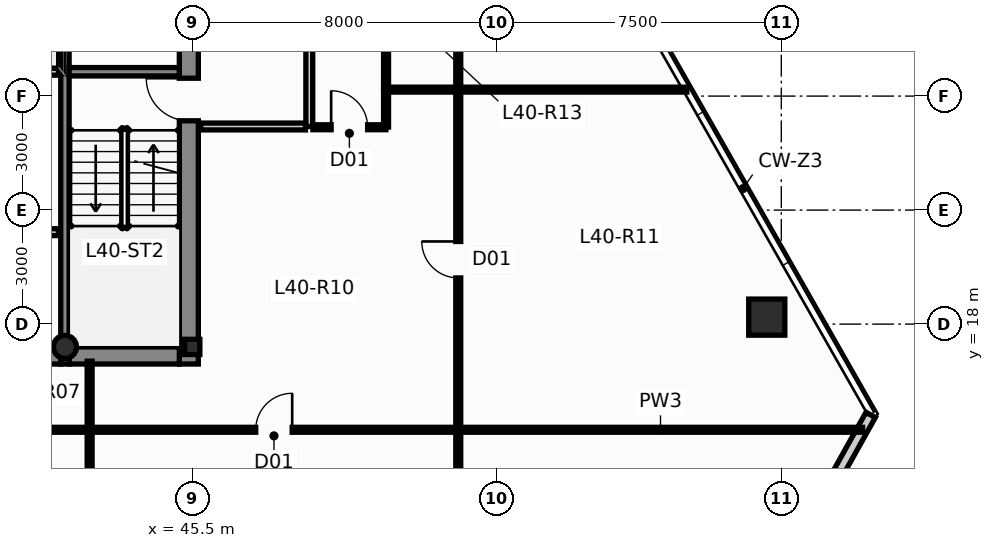
"""IFC4 building model, lengths in metres.
Left out: names, types, materials, properties, quantities, classifications, styles, units other than length and angle.
Written with IfcOpenShell. Run it as: python <this file> out.ifc"""

import sys

from ifc_helpers import new_model, si_unit, direction, frame, frame_2d, origin, origin_2d, place, context, subcontext, project, spatial, rectangle, hollow_rectangle, hollow_circle, i_section, extrude, source, transform, mapped, element, fill, save


model = new_model("IFC4")
c1 = context("Model", 3, precision=1e-05, world=origin(), true_north=direction((0.0, 1.0)))
c2 = subcontext(c1, "Body", "Model", "MODEL_VIEW")
j1 = project(units=[si_unit("LENGTHUNIT", "METRE"), si_unit("PLANEANGLEUNIT", "RADIAN")], contexts=[c1])
p1 = place(None, origin())
s1 = spatial("IfcSite", under=j1, at=p1, CompositionType="ELEMENT")
p2 = place(p1, origin())
s2 = spatial("IfcBuilding", under=s1, at=p2, CompositionType="ELEMENT")
p3 = place(p2, frame((0.0, 0.0, 154.85)))
s3 = spatial("IfcBuildingStorey", under=s2, at=p3, CompositionType="ELEMENT", Elevation=154.85)
m1 = source(origin(), c2, "Body", "SweptSolid", [
    extrude(i_section(OverallWidth=0.4, OverallDepth=0.4, WebThickness=0.02, FlangeThickness=0.032, at=origin_2d()), origin(), (0.0, 0.0, 1.0), 3.65),
])
p4 = place(p3, frame((45.5, 17.4, 0.0), z_axis=(0.0, 0.0, 1.0), x_axis=(1.0, 0.0, 0.0)))
e1 = element("IfcColumn", 1, at=p4, inside=s3, PredefinedType="COLUMN", context=c2, shape_type="MappedRepresentation", body=[
    mapped(m1, transform((0.0, 0.0, 0.0), scale=1.0)),
])
m2 = source(origin(), c2, "Body", "SweptSolid", [
    extrude(hollow_circle(Radius=0.305, WallThickness=0.025, at=origin_2d()), origin(), (0.0, 0.0, 1.0), 3.65),
])
p5 = place(p3, frame((42.15, 17.4, 0.0), z_axis=(0.0, 0.0, 1.0), x_axis=(1.0, 0.0, 0.0)))
e2 = element("IfcColumn", 2, at=p5, inside=s3, PredefinedType="COLUMN", context=c2, shape_type="MappedRepresentation", body=[
    mapped(m2, transform((0.0, 0.0, 0.0), scale=1.0)),
])
p6 = place(p3, frame((45.41, 16.95, 0.0), z_axis=(0.0, 0.0, 1.0), x_axis=(0.0, 1.0, 0.0)))
e3 = element("IfcWall", 3, at=p6, inside=s3, PredefinedType="SHEAR", context=c2, shape_type="SweptSolid", body=[
    extrude(rectangle(XDim=13.275, YDim=0.5, at=frame_2d((6.638, 0.0))), origin(), (0.0, 0.0, 1.0), 3.65),
])
p7 = place(p6, frame((6.4, 0.0, 0.0)))
e4 = element("IfcOpeningElement", 4, at=p7, cuts=e3, PredefinedType="OPENING", context=c2, shape_type="SweptSolid", body=[
    extrude(rectangle(XDim=1.12, YDim=2.15, at=frame_2d((0.56, 1.075))), frame((0.0, 0.262, 0.0), z_axis=(0.0, -1.0, 0.0), x_axis=(1.0, 0.0, 0.0)), (0.0, 0.0, 1.0), 0.524),
])
p8 = place(p6, frame((10.85, 0.0, 0.0)))
e5 = element("IfcOpeningElement", 5, at=p8, cuts=e3, PredefinedType="OPENING", context=c2, shape_type="SweptSolid", body=[
    extrude(rectangle(XDim=1.2, YDim=2.2, at=frame_2d((0.6, 1.1))), frame((0.0, 0.262, 0.0), z_axis=(0.0, -1.0, 0.0), x_axis=(1.0, 0.0, 0.0)), (0.0, 0.0, 1.0), 0.524),
])
p9 = place(p3, frame((33.96, 17.175, 0.0), z_axis=(0.0, 0.0, 1.0), x_axis=(1.0, 0.0, 0.0)))
e6 = element("IfcWall", 6, at=p9, inside=s3, PredefinedType="SHEAR", context=c2, shape_type="SweptSolid", body=[
    extrude(rectangle(XDim=8.08, YDim=0.45, at=frame_2d((4.04, 0.0))), origin(), (0.0, 0.0, 1.0), 3.65),
])
p10 = place(p3, frame((42.26, 17.175, 0.0), z_axis=(0.0, 0.0, 1.0), x_axis=(1.0, 0.0, 0.0)))
e7 = element("IfcWall", 7, at=p10, inside=s3, PredefinedType="SHEAR", context=c2, shape_type="SweptSolid", body=[
    extrude(rectangle(XDim=2.9, YDim=0.45, at=frame_2d((1.45, 0.0))), origin(), (0.0, 0.0, 1.0), 3.65),
])
p11 = place(p3, frame((42.15, 16.95, 0.0), z_axis=(0.0, 0.0, 1.0), x_axis=(0.0, 1.0, 0.0)))
e8 = element("IfcWall", 8, at=p11, inside=s3, PredefinedType="SHEAR", context=c2, shape_type="SweptSolid", body=[
    extrude(rectangle(XDim=13.275, YDim=0.22, at=frame_2d((6.638, 0.0))), origin(), (0.0, 0.0, 1.0), 3.65),
])
p12 = place(p3, frame((42.26, 24.64, 0.0), z_axis=(0.0, 0.0, 1.0), x_axis=(1.0, 0.0, 0.0)))
e9 = element("IfcWall", 9, at=p12, inside=s3, PredefinedType="SHEAR", context=c2, shape_type="SweptSolid", body=[
    extrude(rectangle(XDim=2.9, YDim=0.22, at=frame_2d((1.45, 0.0))), origin(), (0.0, 0.0, 1.0), 3.65),
])
m3 = source(origin(), c2, "Body", "SweptSolid", [
    extrude(hollow_rectangle(XDim=0.95, YDim=0.95, WallThickness=0.05, at=origin_2d()), origin(), (0.0, 0.0, 1.0), 3.651),
])
p13 = place(p3, frame((60.618, 18.184, 0.0), z_axis=(-0.010431780378, -0.021599135014, 0.999712286273), x_axis=(0.900476348161, -0.434904985489, 0.0)))
e10 = element("IfcColumn", 10, at=p13, inside=s3, PredefinedType="COLUMN", context=c2, shape_type="MappedRepresentation", body=[
    mapped(m3, transform((0.0, 0.0, 0.0), scale=1.0)),
])
p14 = place(p3, frame((63.352, 15.613, 0.0), z_axis=(0.0, 0.0, 1.0), x_axis=(-0.487718245704, -0.873001095536, 0.0)))
e11 = element("IfcWall", 11, at=p14, inside=s3, PredefinedType="STANDARD", context=c2, shape_type="SweptSolid", body=[
    extrude(rectangle(XDim=10.561, YDim=0.28, at=frame_2d((5.28, 0.0))), origin(), (0.0, 0.0, 1.0), 3.4),
])
p15 = place(p14, frame((4.53, 0.0, 0.9)))
e12 = element("IfcOpeningElement", 12, at=p15, cuts=e11, PredefinedType="OPENING", context=c2, shape_type="SweptSolid", body=[
    extrude(rectangle(XDim=1.5, YDim=1.8, at=frame_2d((0.75, 0.9))), frame((0.0, 0.152, 0.0), z_axis=(0.0, -1.0, 0.0), x_axis=(1.0, 0.0, 0.0)), (0.0, 0.0, 1.0), 0.304),
])
p16 = place(p3, frame((40.2, 24.64, 0.0), z_axis=(0.0, 0.0, 1.0), x_axis=(1.0, 0.0, 0.0)))
e13 = element("IfcWall", 13, at=p16, inside=s3, PredefinedType="PARTITIONING", context=c2, shape_type="SweptSolid", body=[
    extrude(rectangle(XDim=1.78, YDim=0.18, at=frame_2d((0.89, 0.0))), origin(), (0.0, 0.0, 1.0), 3.4),
])
p17 = place(p3, frame((48.58, 23.2, 0.0), z_axis=(0.0, 0.0, 1.0), x_axis=(0.0, 1.0, 0.0)))
e14 = element("IfcWall", 14, at=p17, inside=s3, PredefinedType="PARTITIONING", context=c2, shape_type="SweptSolid", body=[
    extrude(rectangle(XDim=6.4, YDim=0.18, at=frame_2d((3.2, 0.0))), origin(), (0.0, 0.0, 1.0), 3.078),
])
p18 = place(p17, frame((2.65, 0.0, 0.0)))
e15 = element("IfcOpeningElement", 15, at=p18, cuts=e14, PredefinedType="OPENING", context=c2, shape_type="SweptSolid", body=[
    extrude(rectangle(XDim=1.05, YDim=2.15, at=frame_2d((0.525, 1.075))), frame((0.0, 0.102, 0.0), z_axis=(0.0, -1.0, 0.0), x_axis=(1.0, 0.0, 0.0)), (0.0, 0.0, 1.0), 0.204),
])
p19 = place(p3, frame((45.72, 23.2, 0.0), z_axis=(0.0, 0.0, 1.0), x_axis=(1.0, 0.0, 0.0)))
e16 = element("IfcWall", 16, at=p19, inside=s3, PredefinedType="PARTITIONING", context=c2, shape_type="SweptSolid", body=[
    extrude(rectangle(XDim=2.76, YDim=0.18, at=frame_2d((1.38, 0.0))), origin(), (0.0, 0.0, 1.0), 3.4),
])
p20 = place(p3, frame((40.22, 20.42, 0.0), z_axis=(0.0, 0.0, 1.0), x_axis=(1.0, 0.0, 0.0)))
e17 = element("IfcWall", 17, at=p20, inside=s3, PredefinedType="PARTITIONING", context=c2, shape_type="SweptSolid", body=[
    extrude(rectangle(XDim=1.76, YDim=0.18, at=frame_2d((0.88, 0.0))), origin(), (0.0, 0.0, 1.0), 3.4),
])
p21 = place(p3, frame((52.505, 15.22, 0.0), z_axis=(0.0, 0.0, 1.0), x_axis=(1.0, 0.0, 0.0)))
e18 = element("IfcWall", 18, at=p21, inside=s3, PredefinedType="PARTITIONING", context=c2, shape_type="SweptSolid", body=[
    extrude(rectangle(XDim=10.633, YDim=0.13, at=frame_2d((5.317, 0.0))), origin(), (0.0, 0.0, 1.0), 3.4),
])
p22 = place(p3, frame((42.805, 15.22, 0.0), z_axis=(0.0, 0.0, 1.0), x_axis=(1.0, 0.0, 0.0)))
e19 = element("IfcWall", 19, at=p22, inside=s3, PredefinedType="PARTITIONING", context=c2, shape_type="SweptSolid", body=[
    extrude(rectangle(XDim=9.69, YDim=0.13, at=frame_2d((4.845, 0.0))), origin(), (0.0, 0.0, 1.0), 3.078),
])
p23 = place(p22, frame((4.365, 0.0, 0.0)))
e20 = element("IfcOpeningElement", 20, at=p23, cuts=e19, PredefinedType="OPENING", context=c2, shape_type="SweptSolid", body=[
    extrude(rectangle(XDim=0.96, YDim=2.15, at=frame_2d((0.48, 1.075))), frame((0.0, 0.077, 0.0), z_axis=(0.0, -1.0, 0.0), x_axis=(1.0, 0.0, 0.0)), (0.0, 0.0, 1.0), 0.154),
])
p24 = place(p3, frame((33.205, 15.22, 0.0), z_axis=(0.0, 0.0, 1.0), x_axis=(1.0, 0.0, 0.0)))
e21 = element("IfcWall", 21, at=p24, inside=s3, PredefinedType="PARTITIONING", context=c2, shape_type="SweptSolid", body=[
    extrude(rectangle(XDim=9.59, YDim=0.13, at=frame_2d((4.795, 0.0))), origin(), (0.0, 0.0, 1.0), 3.078),
])
p25 = place(p24, frame((4.315, 0.0, 0.0)))
e22 = element("IfcOpeningElement", 22, at=p25, cuts=e21, PredefinedType="OPENING", context=c2, shape_type="SweptSolid", body=[
    extrude(rectangle(XDim=0.96, YDim=2.15, at=frame_2d((0.48, 1.075))), frame((0.0, 0.077, 0.0), z_axis=(0.0, -1.0, 0.0), x_axis=(1.0, 0.0, 0.0)), (0.0, 0.0, 1.0), 0.154),
])
p26 = place(p3, frame((52.5, 15.225, 0.0), z_axis=(0.0, 0.0, 1.0), x_axis=(0.0, 1.0, 0.0)))
e23 = element("IfcWall", 23, at=p26, inside=s3, PredefinedType="PARTITIONING", context=c2, shape_type="SweptSolid", body=[
    extrude(rectangle(XDim=8.94, YDim=0.13, at=frame_2d((4.47, 0.0))), origin(), (0.0, 0.0, 1.0), 3.078),
])
p27 = place(p26, frame((3.99, 0.0, 0.0)))
e24 = element("IfcOpeningElement", 24, at=p27, cuts=e23, PredefinedType="OPENING", context=c2, shape_type="SweptSolid", body=[
    extrude(rectangle(XDim=0.96, YDim=2.15, at=frame_2d((0.48, 1.075))), frame((0.0, 0.077, 0.0), z_axis=(0.0, -1.0, 0.0), x_axis=(1.0, 0.0, 0.0)), (0.0, 0.0, 1.0), 0.154),
])
p28 = place(p3, frame((52.5, 6.409, 0.0), z_axis=(0.0, 0.0, 1.0), x_axis=(0.0, 1.0, 0.0)))
e25 = element("IfcWall", 25, at=p28, inside=s3, PredefinedType="PARTITIONING", context=c2, shape_type="SweptSolid", body=[
    extrude(rectangle(XDim=8.806, YDim=0.13, at=frame_2d((4.403, 0.0))), origin(), (0.0, 0.0, 1.0), 3.4),
])
p29 = place(p28, frame((3.973, 0.0, 0.0)))
e26 = element("IfcOpeningElement", 26, at=p29, cuts=e25, PredefinedType="OPENING", context=c2, shape_type="SweptSolid", body=[
    extrude(rectangle(XDim=0.96, YDim=2.15, at=frame_2d((0.48, 1.075))), frame((0.0, 0.077, 0.0), z_axis=(0.0, -1.0, 0.0), x_axis=(1.0, 0.0, 0.0)), (0.0, 0.0, 1.0), 0.154),
])
p30 = place(p3, frame((42.8, 6.489, 0.0), z_axis=(0.0, 0.0, 1.0), x_axis=(0.0, 1.0, 0.0)))
e27 = element("IfcWall", 27, at=p30, inside=s3, PredefinedType="PARTITIONING", context=c2, shape_type="SweptSolid", body=[
    extrude(rectangle(XDim=8.726, YDim=0.13, at=frame_2d((4.363, 0.0))), origin(), (0.0, 0.0, 1.0), 3.4),
])
p31 = place(p3, frame((52.505, 24.17, 0.0), z_axis=(0.0, 0.0, 1.0), x_axis=(1.0, 0.0, 0.0)))
e28 = element("IfcWall", 28, at=p31, inside=s3, PredefinedType="PARTITIONING", context=c2, shape_type="SweptSolid", body=[
    extrude(rectangle(XDim=6.01, YDim=0.13, at=frame_2d((3.005, 0.0))), origin(), (0.0, 0.0, 1.0), 3.4),
])
p32 = place(p3, frame((50.6, 24.175, 0.0), z_axis=(0.0, 0.0, 1.0), x_axis=(0.0, 1.0, 0.0)))
e29 = element("IfcWall", 29, at=p32, inside=s3, PredefinedType="PARTITIONING", context=c2, shape_type="SweptSolid", body=[
    extrude(rectangle(XDim=5.92, YDim=0.13, at=frame_2d((2.96, 0.0))), origin(), (0.0, 0.0, 1.0), 3.078),
])
p33 = place(p32, frame((2.48, 0.0, 0.0)))
e30 = element("IfcOpeningElement", 30, at=p33, cuts=e29, PredefinedType="OPENING", context=c2, shape_type="SweptSolid", body=[
    extrude(rectangle(XDim=0.96, YDim=2.15, at=frame_2d((0.48, 1.075))), frame((0.0, 0.077, 0.0), z_axis=(0.0, -1.0, 0.0), x_axis=(1.0, 0.0, 0.0)), (0.0, 0.0, 1.0), 0.154),
])
p34 = place(p3, frame((52.5, 24.175, 0.0), z_axis=(0.0, 0.0, 1.0), x_axis=(0.0, 1.0, 0.0)))
e31 = element("IfcWall", 31, at=p34, inside=s3, PredefinedType="PARTITIONING", context=c2, shape_type="SweptSolid", body=[
    extrude(rectangle(XDim=5.92, YDim=0.13, at=frame_2d((2.96, 0.0))), origin(), (0.0, 0.0, 1.0), 3.078),
])
p35 = place(p34, frame((2.48, 0.0, 0.0)))
e32 = element("IfcOpeningElement", 32, at=p35, cuts=e31, PredefinedType="OPENING", context=c2, shape_type="SweptSolid", body=[
    extrude(rectangle(XDim=0.96, YDim=2.15, at=frame_2d((0.48, 1.075))), frame((0.0, 0.077, 0.0), z_axis=(0.0, -1.0, 0.0), x_axis=(1.0, 0.0, 0.0)), (0.0, 0.0, 1.0), 0.154),
])
p36 = place(p3, frame((48.675, 23.18, 0.0), z_axis=(0.0, 0.0, 1.0), x_axis=(1.0, 0.0, 0.0)))
e33 = element("IfcWall", 33, at=p36, inside=s3, PredefinedType="PARTITIONING", context=c2, shape_type="SweptSolid", body=[
    extrude(rectangle(XDim=1.92, YDim=0.13, at=frame_2d((0.96, 0.0))), origin(), (0.0, 0.0, 1.0), 3.4),
])
p37 = place(p36, frame((0.48, 0.0, 0.0)))
e34 = element("IfcOpeningElement", 34, at=p37, cuts=e33, PredefinedType="OPENING", context=c2, shape_type="SweptSolid", body=[
    extrude(rectangle(XDim=0.96, YDim=2.15, at=frame_2d((0.48, 1.075))), frame((0.0, 0.077, 0.0), z_axis=(0.0, -1.0, 0.0), x_axis=(1.0, 0.0, 0.0)), (0.0, 0.0, 1.0), 0.154),
])
p38 = place(p3, frame((50.605, 24.17, 0.0), z_axis=(0.0, 0.0, 1.0), x_axis=(1.0, 0.0, 0.0)))
e35 = element("IfcWall", 35, at=p38, inside=s3, PredefinedType="PARTITIONING", context=c2, shape_type="SweptSolid", body=[
    extrude(rectangle(XDim=1.89, YDim=0.13, at=frame_2d((0.945, 0.0))), origin(), (0.0, 0.0, 1.0), 3.4),
])
p39 = place(p3, frame((42.8, 15.225, 0.0), z_axis=(0.0, 0.0, 1.0), x_axis=(0.0, 1.0, 0.0)))
e36 = element("IfcWall", 36, at=p39, inside=s3, PredefinedType="PARTITIONING", context=c2, shape_type="SweptSolid", body=[
    extrude(rectangle(XDim=1.8, YDim=0.13, at=frame_2d((0.9, 0.0))), origin(), (0.0, 0.0, 1.0), 3.4),
])
p40 = place(p3, frame((50.6, 23.185, 0.0), z_axis=(0.0, 0.0, 1.0), x_axis=(0.0, 1.0, 0.0)))
e37 = element("IfcWall", 37, at=p40, inside=s3, PredefinedType="PARTITIONING", context=c2, shape_type="SweptSolid", body=[
    extrude(rectangle(XDim=0.98, YDim=0.13, at=frame_2d((0.49, 0.0))), origin(), (0.0, 0.0, 1.0), 3.4),
])
p41 = place(p7, origin())
e38 = element("IfcDoor", 38, at=p41, inside=s3, OperationType="SINGLE_SWING_RIGHT", PredefinedType="DOOR", context=c2, shape_type="SweptSolid", body=[
    extrude(rectangle(XDim=1.12, YDim=2.15, at=frame_2d((0.56, 1.075))), frame((0.0, 0.025, 0.0), z_axis=(0.0, -1.0, 0.0), x_axis=(1.0, 0.0, 0.0)), (0.0, 0.0, 1.0), 0.05),
])
fill(e4, e38)
p42 = place(p23, origin())
e39 = element("IfcDoor", 39, at=p42, inside=s3, OperationType="SINGLE_SWING_RIGHT", PredefinedType="DOOR", context=c2, shape_type="SweptSolid", body=[
    extrude(rectangle(XDim=0.96, YDim=2.15, at=frame_2d((0.48, 1.075))), frame((0.0, 0.025, 0.0), z_axis=(0.0, -1.0, 0.0), x_axis=(1.0, 0.0, 0.0)), (0.0, 0.0, 1.0), 0.05),
])
fill(e20, e39)
p43 = place(p27, origin())
e40 = element("IfcDoor", 40, at=p43, inside=s3, OperationType="SINGLE_SWING_RIGHT", PredefinedType="DOOR", context=c2, shape_type="SweptSolid", body=[
    extrude(rectangle(XDim=0.96, YDim=2.15, at=frame_2d((0.48, 1.075))), frame((0.0, 0.025, 0.0), z_axis=(0.0, -1.0, 0.0), x_axis=(1.0, 0.0, 0.0)), (0.0, 0.0, 1.0), 0.05),
])
fill(e24, e40)
p44 = place(p37, origin())
e41 = element("IfcDoor", 41, at=p44, inside=s3, OperationType="SINGLE_SWING_LEFT", PredefinedType="DOOR", context=c2, shape_type="SweptSolid", body=[
    extrude(rectangle(XDim=0.96, YDim=2.15, at=frame_2d((0.48, 1.075))), frame((0.0, 0.025, 0.0), z_axis=(0.0, -1.0, 0.0), x_axis=(1.0, 0.0, 0.0)), (0.0, 0.0, 1.0), 0.05),
])
fill(e34, e41)
save(model, sys.argv[1])
